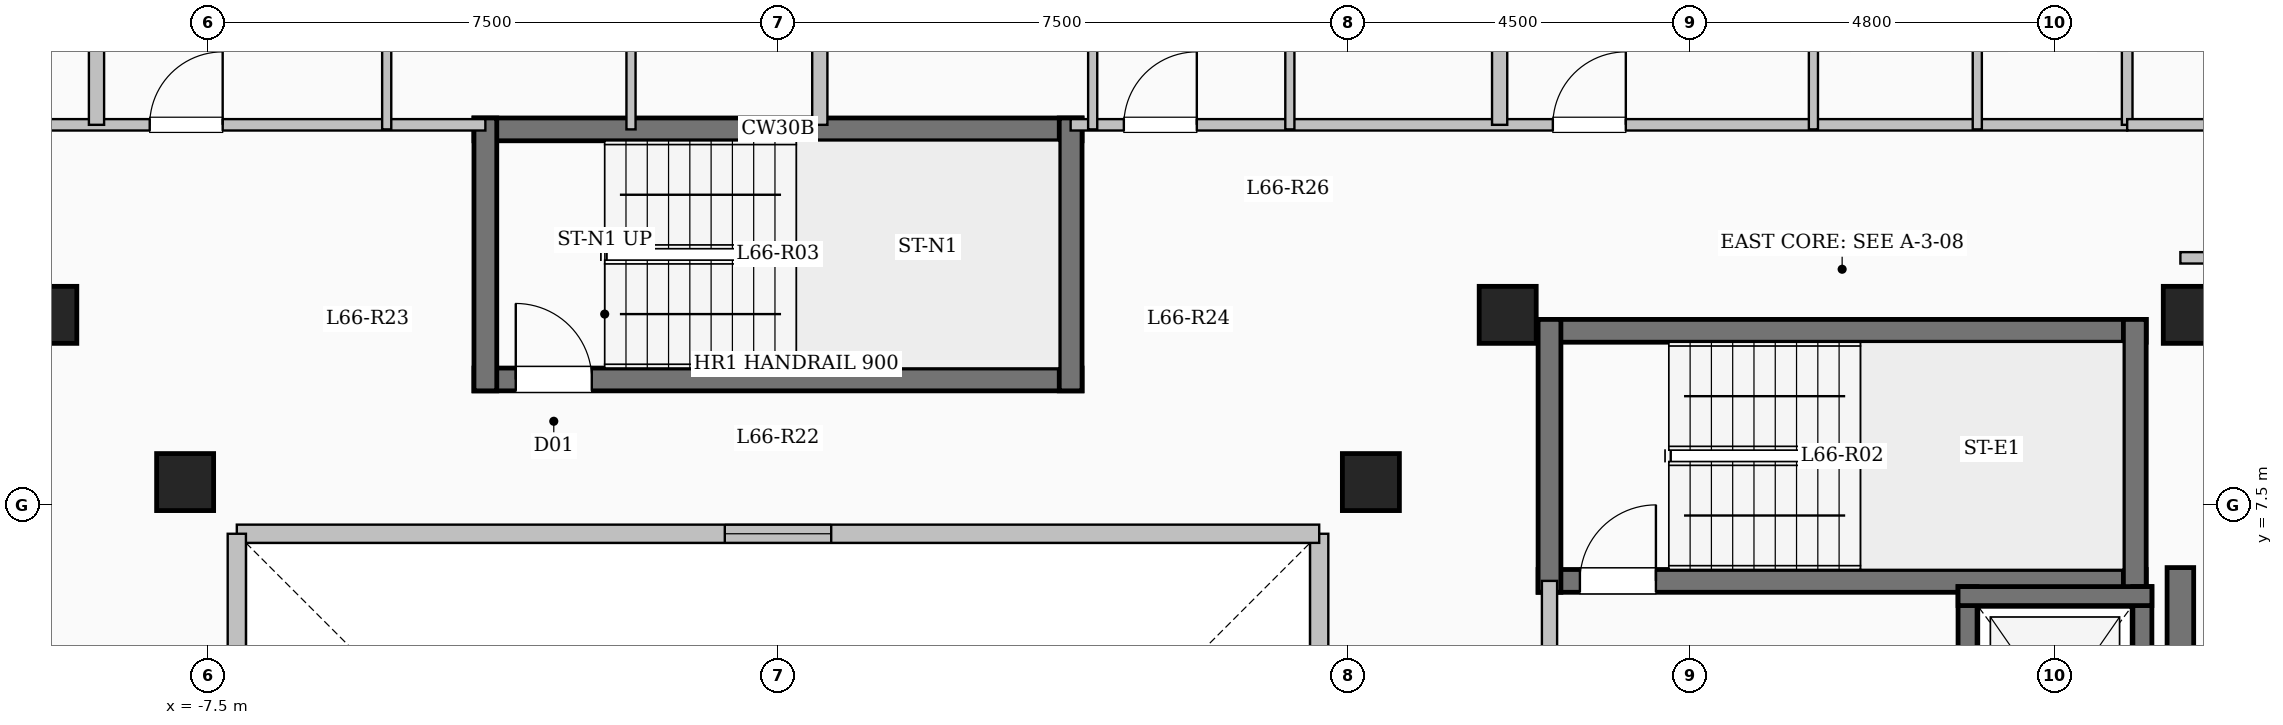
"""IFC4 building model, lengths in metres.
Left out: names, types, materials, properties, quantities, classifications, styles, units other than length and angle.
Written with IfcOpenShell. Run it as: python <this file> out.ifc"""

import sys

from ifc_helpers import new_model, si_unit, direction, frame, frame_2d, origin, origin_2d, place, context, subcontext, project, spatial, rectangle, extrude, element, fill, save


model = new_model("IFC4")
c1 = context("Model", 3, precision=1e-05, world=origin(), true_north=direction((0.0, 1.0)))
c2 = subcontext(c1, "Body", "Model", "MODEL_VIEW")
j1 = project(units=[si_unit("LENGTHUNIT", "METRE"), si_unit("PLANEANGLEUNIT", "RADIAN")], contexts=[c1])
p1 = place(None, origin())
s1 = spatial("IfcSite", under=j1, at=p1, CompositionType="ELEMENT")
p2 = place(p1, origin())
s2 = spatial("IfcBuilding", under=s1, at=p2, CompositionType="ELEMENT")
p3 = place(p2, frame((0.0, 0.0, 244.85)))
s3 = spatial("IfcBuildingStorey", under=s2, at=p3, CompositionType="ELEMENT", Elevation=244.85)
for number, where, z_axis, x_axis in (
    (1, (-7.8, 7.8, 0.0), (0.0, 0.0, 1.0), (1.0, 0.0, 0.0)),
    (2, (7.8, 7.8, 0.0), (0.0, 0.0, 1.0), (1.0, 0.0, 0.0)),
    (3, (-9.6, 10.0, 0.0), (0.0, 0.0, 1.0), (1.0, 0.0, 0.0)),
    (4, (9.6, 10.0, 0.0), (0.0, 0.0, 1.0), (1.0, 0.0, 0.0)),
    (5, (18.6, 10.0, 0.0), (0.0, 0.0, 1.0), (1.0, 0.0, 0.0)),
):
    element("IfcColumn", number, at=place(p3, frame(where, z_axis=z_axis, x_axis=x_axis)), inside=s3, PredefinedType="COLUMN", context=c2, shape_type="SweptSolid", body=[
        extrude(rectangle(XDim=0.75, YDim=0.75, at=origin_2d()), origin(), (0.0, 0.0, 1.0), 3.35),
    ])
p4 = place(p3, frame((7.12, -7.12, 0.0), z_axis=(0.0, 0.0, 1.0), x_axis=(0.0, 1.0, 0.0)))
e6 = element("IfcWall", 6, at=p4, inside=s3, PredefinedType="SOLIDWALL", context=c2, shape_type="SweptSolid", body=[
    extrude(rectangle(XDim=14.24, YDim=0.24, at=frame_2d((7.12, 0.0))), origin(), (0.0, 0.0, 1.0), 3.1),
])
p5 = place(p4, frame((6.42, 0.0, 0.95)))
e7 = element("IfcOpeningElement", 7, at=p5, cuts=e6, PredefinedType="OPENING", context=c2, shape_type="SweptSolid", body=[
    extrude(rectangle(XDim=1.4, YDim=1.5, at=frame_2d((0.7, 0.75))), frame((0.0, 0.13, 0.0), z_axis=(0.0, -1.0, 0.0), x_axis=(1.0, 0.0, 0.0)), (0.0, 0.0, 1.0), 0.26),
])
p6 = place(p3, frame((7.12, 7.12, 0.0), z_axis=(0.0, 0.0, 1.0), x_axis=(-1.0, 0.0, 0.0)))
e8 = element("IfcWall", 8, at=p6, inside=s3, PredefinedType="SOLIDWALL", context=c2, shape_type="SweptSolid", body=[
    extrude(rectangle(XDim=14.24, YDim=0.24, at=frame_2d((7.12, 0.0))), origin(), (0.0, 0.0, 1.0), 3.1),
])
p7 = place(p6, frame((6.42, 0.0, 0.95)))
e9 = element("IfcOpeningElement", 9, at=p7, cuts=e8, PredefinedType="OPENING", context=c2, shape_type="SweptSolid", body=[
    extrude(rectangle(XDim=1.4, YDim=1.5, at=frame_2d((0.7, 0.75))), frame((0.0, 0.13, 0.0), z_axis=(0.0, -1.0, 0.0), x_axis=(1.0, 0.0, 0.0)), (0.0, 0.0, 1.0), 0.26),
])
p8 = place(p3, frame((-7.12, 7.12, 0.0), z_axis=(0.0, 0.0, 1.0), x_axis=(0.0, -1.0, 0.0)))
e10 = element("IfcWall", 10, at=p8, inside=s3, PredefinedType="SOLIDWALL", context=c2, shape_type="SweptSolid", body=[
    extrude(rectangle(XDim=14.24, YDim=0.24, at=frame_2d((7.12, 0.0))), origin(), (0.0, 0.0, 1.0), 3.1),
])
p9 = place(p8, frame((6.42, 0.0, 0.95)))
e11 = element("IfcOpeningElement", 11, at=p9, cuts=e10, PredefinedType="OPENING", context=c2, shape_type="SweptSolid", body=[
    extrude(rectangle(XDim=1.4, YDim=1.5, at=frame_2d((0.7, 0.75))), frame((0.0, 0.13, 0.0), z_axis=(0.0, -1.0, 0.0), x_axis=(1.0, 0.0, 0.0)), (0.0, 0.0, 1.0), 0.26),
])
p10 = place(p3, frame((10.0, 9.79, 0.0), z_axis=(0.0, 0.0, 1.0), x_axis=(1.0, 0.0, 0.0)))
e12 = element("IfcWall", 12, at=p10, inside=s3, PredefinedType="SHEAR", context=c2, shape_type="SweptSolid", body=[
    extrude(rectangle(XDim=8.0, YDim=0.3, at=frame_2d((4.0, 0.0))), origin(), (0.0, 0.0, 1.0), 3.35),
])
p11 = place(p3, frame((10.0, 6.5, 0.0), z_axis=(0.0, 0.0, 1.0), x_axis=(1.0, 0.0, 0.0)))
e13 = element("IfcWall", 13, at=p11, inside=s3, PredefinedType="SHEAR", context=c2, shape_type="SweptSolid", body=[
    extrude(rectangle(XDim=8.0, YDim=0.3, at=frame_2d((4.0, 0.0))), origin(), (0.0, 0.0, 1.0), 3.35),
])
p12 = place(p11, frame((0.55, 0.0, 0.0)))
e14 = element("IfcOpeningElement", 14, at=p12, cuts=e13, PredefinedType="OPENING", context=c2, shape_type="SweptSolid", body=[
    extrude(rectangle(XDim=1.0, YDim=2.15, at=frame_2d((0.5, 1.075))), frame((0.0, 0.16, 0.0), z_axis=(0.0, -1.0, 0.0), x_axis=(1.0, 0.0, 0.0)), (0.0, 0.0, 1.0), 0.32),
])
for number, where, z_axis, x_axis in (
    (15, (10.15, 6.35, 0.0), (0.0, 0.0, 1.0), (0.0, 1.0, 0.0)),
    (16, (17.85, 6.35, 0.0), (0.0, 0.0, 1.0), (0.0, 1.0, 0.0)),
):
    element("IfcWall", number, at=place(p3, frame(where, z_axis=z_axis, x_axis=x_axis)), inside=s3, PredefinedType="SHEAR", context=c2, shape_type="SweptSolid", body=[
        extrude(rectangle(XDim=3.59, YDim=0.3, at=frame_2d((1.795, 0.0))), origin(), (0.0, 0.0, 1.0), 3.35),
    ])
p13 = place(p3, frame((-4.0, 12.44, 0.0), z_axis=(0.0, 0.0, 1.0), x_axis=(1.0, 0.0, 0.0)))
e17 = element("IfcWall", 17, at=p13, inside=s3, PredefinedType="SHEAR", context=c2, shape_type="SweptSolid", body=[
    extrude(rectangle(XDim=8.0, YDim=0.3, at=frame_2d((4.0, 0.0))), origin(), (0.0, 0.0, 1.0), 3.35),
])
p14 = place(p3, frame((-4.0, 9.15, 0.0), z_axis=(0.0, 0.0, 1.0), x_axis=(1.0, 0.0, 0.0)))
e18 = element("IfcWall", 18, at=p14, inside=s3, PredefinedType="SHEAR", context=c2, shape_type="SweptSolid", body=[
    extrude(rectangle(XDim=8.0, YDim=0.3, at=frame_2d((4.0, 0.0))), origin(), (0.0, 0.0, 1.0), 3.35),
])
p15 = place(p14, frame((0.55, 0.0, 0.0)))
e19 = element("IfcOpeningElement", 19, at=p15, cuts=e18, PredefinedType="OPENING", context=c2, shape_type="SweptSolid", body=[
    extrude(rectangle(XDim=1.0, YDim=2.15, at=frame_2d((0.5, 1.075))), frame((0.0, 0.16, 0.0), z_axis=(0.0, -1.0, 0.0), x_axis=(1.0, 0.0, 0.0)), (0.0, 0.0, 1.0), 0.32),
])
for number, where, z_axis, x_axis in (
    (20, (-3.85, 9.0, 0.0), (0.0, 0.0, 1.0), (0.0, 1.0, 0.0)),
    (21, (3.85, 9.0, 0.0), (0.0, 0.0, 1.0), (0.0, 1.0, 0.0)),
):
    element("IfcWall", number, at=place(p3, frame(where, z_axis=z_axis, x_axis=x_axis)), inside=s3, PredefinedType="SHEAR", context=c2, shape_type="SweptSolid", body=[
        extrude(rectangle(XDim=3.59, YDim=0.3, at=frame_2d((1.795, 0.0))), origin(), (0.0, 0.0, 1.0), 3.35),
    ])
p16 = place(p3, frame((10.15, 3.25, 0.0), z_axis=(0.0, 0.0, 1.0), x_axis=(0.0, 1.0, 0.0)))
e22 = element("IfcWall", 22, at=p16, inside=s3, PredefinedType="SOLIDWALL", context=c2, shape_type="SweptSolid", body=[
    extrude(rectangle(XDim=3.25, YDim=0.2, at=frame_2d((1.625, 0.0))), origin(), (0.0, 0.0, 1.0), 3.1),
])
p17 = place(p16, frame((1.1, 0.0, 0.0)))
e23 = element("IfcOpeningElement", 23, at=p17, cuts=e22, PredefinedType="OPENING", context=c2, shape_type="SweptSolid", body=[
    extrude(rectangle(XDim=1.02, YDim=2.15, at=frame_2d((0.51, 1.075))), frame((0.0, 0.11, 0.0), z_axis=(0.0, -1.0, 0.0), x_axis=(1.0, 0.0, 0.0)), (0.0, 0.0, 1.0), 0.22),
])
p18 = place(p3, frame((15.65, 3.175, 0.0), z_axis=(0.0, 0.0, 1.0), x_axis=(0.0, 1.0, 0.0)))
e24 = element("IfcWall", 24, at=p18, inside=s3, PredefinedType="SHEAR", context=c2, shape_type="SweptSolid", body=[
    extrude(rectangle(XDim=3.25, YDim=0.25, at=frame_2d((1.625, 0.0))), origin(), (0.0, 0.0, 1.0), 3.35),
])
p19 = place(p18, frame((1.075, 0.0, 0.0)))
e25 = element("IfcOpeningElement", 25, at=p19, cuts=e24, PredefinedType="OPENING", context=c2, shape_type="SweptSolid", body=[
    extrude(rectangle(XDim=1.1, YDim=2.15, at=frame_2d((0.55, 1.075))), frame((0.0, 0.135, 0.0), z_axis=(0.0, -1.0, 0.0), x_axis=(1.0, 0.0, 0.0)), (0.0, 0.0, 1.0), 0.27),
])
p20 = place(p3, frame((17.95, 3.175, 0.0), z_axis=(0.0, 0.0, 1.0), x_axis=(0.0, 1.0, 0.0)))
e26 = element("IfcWall", 26, at=p20, inside=s3, PredefinedType="SHEAR", context=c2, shape_type="SweptSolid", body=[
    extrude(rectangle(XDim=3.25, YDim=0.25, at=frame_2d((1.625, 0.0))), origin(), (0.0, 0.0, 1.0), 3.35),
])
p21 = place(p3, frame((15.525, 6.3, 0.0), z_axis=(0.0, 0.0, 1.0), x_axis=(1.0, 0.0, 0.0)))
e27 = element("IfcWall", 27, at=p21, inside=s3, PredefinedType="SHEAR", context=c2, shape_type="SweptSolid", body=[
    extrude(rectangle(XDim=2.55, YDim=0.25, at=frame_2d((1.275, 0.0))), origin(), (0.0, 0.0, 1.0), 3.35),
])
p22 = place(p3, frame((18.45, -7.375, 0.0), z_axis=(0.0, 0.0, 1.0), x_axis=(0.0, 1.0, 0.0)))
e28 = element("IfcWall", 28, at=p22, inside=s3, PredefinedType="SHEAR", context=c2, shape_type="SweptSolid", body=[
    extrude(rectangle(XDim=14.05, YDim=0.35, at=frame_2d((7.025, 0.0))), origin(), (0.0, 0.0, 1.0), 3.35),
])
p23 = place(p3, frame((-17.75, 12.5, 0.0), z_axis=(0.0, 0.0, 1.0), x_axis=(1.0, 0.0, 0.0)))
e29 = element("IfcWall", 29, at=p23, inside=s3, PredefinedType="PARTITIONING", context=c2, shape_type="SweptSolid", body=[
    extrude(rectangle(XDim=13.9, YDim=0.15, at=frame_2d((6.95, 0.0))), origin(), (0.0, 0.0, 1.0), 3.1),
])
p24 = place(p23, frame((0.7, 0.0, 0.0)))
e30 = element("IfcOpeningElement", 30, at=p24, cuts=e29, PredefinedType="OPENING", context=c2, shape_type="SweptSolid", body=[
    extrude(rectangle(XDim=0.96, YDim=2.15, at=frame_2d((0.48, 1.075))), frame((0.0, 0.085, 0.0), z_axis=(0.0, -1.0, 0.0), x_axis=(1.0, 0.0, 0.0)), (0.0, 0.0, 1.0), 0.17),
])
p25 = place(p23, frame((9.484, 0.0, 0.0)))
e31 = element("IfcOpeningElement", 31, at=p25, cuts=e29, PredefinedType="OPENING", context=c2, shape_type="SweptSolid", body=[
    extrude(rectangle(XDim=0.96, YDim=2.15, at=frame_2d((0.48, 1.075))), frame((0.0, 0.085, 0.0), z_axis=(0.0, -1.0, 0.0), x_axis=(1.0, 0.0, 0.0)), (0.0, 0.0, 1.0), 0.17),
])
p26 = place(p3, frame((3.85, 12.5, 0.0), z_axis=(0.0, 0.0, 1.0), x_axis=(1.0, 0.0, 0.0)))
e32 = element("IfcWall", 32, at=p26, inside=s3, PredefinedType="PARTITIONING", context=c2, shape_type="SweptSolid", body=[
    extrude(rectangle(XDim=13.9, YDim=0.15, at=frame_2d((6.95, 0.0))), origin(), (0.0, 0.0, 1.0), 3.1),
])
p27 = place(p26, frame((0.7, 0.0, 0.0)))
e33 = element("IfcOpeningElement", 33, at=p27, cuts=e32, PredefinedType="OPENING", context=c2, shape_type="SweptSolid", body=[
    extrude(rectangle(XDim=0.96, YDim=2.15, at=frame_2d((0.48, 1.075))), frame((0.0, 0.085, 0.0), z_axis=(0.0, -1.0, 0.0), x_axis=(1.0, 0.0, 0.0)), (0.0, 0.0, 1.0), 0.17),
])
p28 = place(p26, frame((6.344, 0.0, 0.0)))
e34 = element("IfcOpeningElement", 34, at=p28, cuts=e32, PredefinedType="OPENING", context=c2, shape_type="SweptSolid", body=[
    extrude(rectangle(XDim=0.96, YDim=2.15, at=frame_2d((0.48, 1.075))), frame((0.0, 0.085, 0.0), z_axis=(0.0, -1.0, 0.0), x_axis=(1.0, 0.0, 0.0)), (0.0, 0.0, 1.0), 0.17),
])
p29 = place(p3, frame((0.55, 12.5, 0.0), z_axis=(0.0, 0.0, 1.0), x_axis=(0.0, 1.0, 0.0)))
e35 = element("IfcWall", 35, at=p29, inside=s3, PredefinedType="SOLIDWALL", context=c2, shape_type="SweptSolid", body=[
    extrude(rectangle(XDim=9.88, YDim=0.2, at=frame_2d((4.94, 0.0))), origin(), (0.0, 0.0, 1.0), 3.1),
])
p30 = place(p3, frame((-8.966, 12.5, 0.0), z_axis=(0.0, 0.0, 1.0), x_axis=(0.0, 1.0, 0.0)))
e36 = element("IfcWall", 36, at=p30, inside=s3, PredefinedType="SOLIDWALL", context=c2, shape_type="SweptSolid", body=[
    extrude(rectangle(XDim=8.902, YDim=0.2, at=frame_2d((4.451, 0.0))), origin(), (0.0, 0.0, 1.0), 3.1),
])
p31 = place(p3, frame((-5.148, 12.44, 0.0), z_axis=(0.0, 0.0, 1.0), x_axis=(0.0, 1.0, 0.0)))
e37 = element("IfcWall", 37, at=p31, inside=s3, PredefinedType="PARTITIONING", context=c2, shape_type="SweptSolid", body=[
    extrude(rectangle(XDim=9.903, YDim=0.12, at=frame_2d((4.952, 0.0))), origin(), (0.0, 0.0, 1.0), 3.1),
])
p32 = place(p31, frame((3.075, 0.0, 0.0)))
e38 = element("IfcOpeningElement", 38, at=p32, cuts=e37, PredefinedType="OPENING", context=c2, shape_type="SweptSolid", body=[
    extrude(rectangle(XDim=1.08, YDim=2.15, at=frame_2d((0.54, 1.075))), frame((0.0, 0.07, 0.0), z_axis=(0.0, -1.0, 0.0), x_axis=(1.0, 0.0, 0.0)), (0.0, 0.0, 1.0), 0.14),
])
p33 = place(p3, frame((-1.934, 12.44, 0.0), z_axis=(0.0, 0.0, 1.0), x_axis=(0.0, 1.0, 0.0)))
e39 = element("IfcWall", 39, at=p33, inside=s3, PredefinedType="PARTITIONING", context=c2, shape_type="SweptSolid", body=[
    extrude(rectangle(XDim=2.79, YDim=0.12, at=frame_2d((1.395, 0.0))), origin(), (0.0, 0.0, 1.0), 3.1),
])
p34 = place(p3, frame((9.494, 12.5, 0.0), z_axis=(0.0, 0.0, 1.0), x_axis=(0.0, 1.0, 0.0)))
e40 = element("IfcWall", 40, at=p34, inside=s3, PredefinedType="SOLIDWALL", context=c2, shape_type="SweptSolid", body=[
    extrude(rectangle(XDim=8.771, YDim=0.2, at=frame_2d((4.385, 0.0))), origin(), (0.0, 0.0, 1.0), 3.1),
])
p35 = place(p3, frame((4.14, 12.44, 0.0), z_axis=(0.0, 0.0, 1.0), x_axis=(0.0, 1.0, 0.0)))
e41 = element("IfcWall", 41, at=p35, inside=s3, PredefinedType="PARTITIONING", context=c2, shape_type="SweptSolid", body=[
    extrude(rectangle(XDim=9.94, YDim=0.12, at=frame_2d((4.97, 0.0))), origin(), (0.0, 0.0, 1.0), 3.1),
])
p36 = place(p35, frame((3.245, 0.0, 0.0)))
e42 = element("IfcOpeningElement", 42, at=p36, cuts=e41, PredefinedType="OPENING", context=c2, shape_type="SweptSolid", body=[
    extrude(rectangle(XDim=1.08, YDim=2.15, at=frame_2d((0.54, 1.075))), frame((0.0, 0.07, 0.0), z_axis=(0.0, -1.0, 0.0), x_axis=(1.0, 0.0, 0.0)), (0.0, 0.0, 1.0), 0.14),
])
p37 = place(p3, frame((6.734, 12.44, 0.0), z_axis=(0.0, 0.0, 1.0), x_axis=(0.0, 1.0, 0.0)))
e43 = element("IfcWall", 43, at=p37, inside=s3, PredefinedType="PARTITIONING", context=c2, shape_type="SweptSolid", body=[
    extrude(rectangle(XDim=2.96, YDim=0.12, at=frame_2d((1.48, 0.0))), origin(), (0.0, 0.0, 1.0), 3.1),
])
p38 = place(p3, frame((13.622, 12.44, 0.0), z_axis=(0.0, 0.0, 1.0), x_axis=(0.0, 1.0, 0.0)))
e44 = element("IfcWall", 44, at=p38, inside=s3, PredefinedType="PARTITIONING", context=c2, shape_type="SweptSolid", body=[
    extrude(rectangle(XDim=8.46, YDim=0.12, at=frame_2d((4.23, 0.0))), origin(), (0.0, 0.0, 1.0), 3.1),
])
p39 = place(p38, frame((2.735, 0.0, 0.0)))
e45 = element("IfcOpeningElement", 45, at=p39, cuts=e44, PredefinedType="OPENING", context=c2, shape_type="SweptSolid", body=[
    extrude(rectangle(XDim=1.08, YDim=2.15, at=frame_2d((0.54, 1.075))), frame((0.0, 0.07, 0.0), z_axis=(0.0, -1.0, 0.0), x_axis=(1.0, 0.0, 0.0)), (0.0, 0.0, 1.0), 0.14),
])
p40 = place(p3, frame((15.778, 12.44, 0.0), z_axis=(0.0, 0.0, 1.0), x_axis=(0.0, 1.0, 0.0)))
e46 = element("IfcWall", 46, at=p40, inside=s3, PredefinedType="PARTITIONING", context=c2, shape_type="SweptSolid", body=[
    extrude(rectangle(XDim=2.45, YDim=0.12, at=frame_2d((1.225, 0.0))), origin(), (0.0, 0.0, 1.0), 3.1),
])
p41 = place(p3, frame((18.45, 10.75, 0.0), z_axis=(0.0, 0.0, 1.0), x_axis=(1.0, 0.0, 0.0)))
e47 = element("IfcWall", 47, at=p41, inside=s3, PredefinedType="PARTITIONING", context=c2, shape_type="SweptSolid", body=[
    extrude(rectangle(XDim=4.23, YDim=0.15, at=frame_2d((2.115, 0.0))), origin(), (0.0, 0.0, 1.0), 3.1),
])
p42 = place(p3, frame((17.75, 12.5, 0.0), z_axis=(0.0, 0.0, 1.0), x_axis=(0.0, 1.0, 0.0)))
e48 = element("IfcWall", 48, at=p42, inside=s3, PredefinedType="PARTITIONING", context=c2, shape_type="SweptSolid", body=[
    extrude(rectangle(XDim=5.05, YDim=0.14, at=frame_2d((2.525, 0.0))), origin(), (0.0, 0.0, 1.0), 3.1),
])
p43 = place(p3, frame((17.75, 12.5, 0.0), z_axis=(0.0, 0.0, 1.0), x_axis=(1.0, 0.0, 0.0)))
e49 = element("IfcWall", 49, at=p43, inside=s3, PredefinedType="PARTITIONING", context=c2, shape_type="SweptSolid", body=[
    extrude(rectangle(XDim=4.93, YDim=0.15, at=frame_2d((2.465, 0.0))), origin(), (0.0, 0.0, 1.0), 3.1),
])
p44 = place(p43, frame((1.99, 0.0, 0.0)))
e50 = element("IfcOpeningElement", 50, at=p44, cuts=e49, PredefinedType="OPENING", context=c2, shape_type="SweptSolid", body=[
    extrude(rectangle(XDim=0.95, YDim=2.15, at=frame_2d((0.475, 1.075))), frame((0.0, 0.085, 0.0), z_axis=(0.0, -1.0, 0.0), x_axis=(1.0, 0.0, 0.0)), (0.0, 0.0, 1.0), 0.17),
])
p45 = place(p7, origin())
e51 = element("IfcWindow", 51, at=p45, inside=s3, PartitioningType="SINGLE_PANEL", PredefinedType="WINDOW", context=c2, shape_type="SweptSolid", body=[
    extrude(rectangle(XDim=1.4, YDim=1.5, at=frame_2d((0.7, 0.75))), frame((0.0, 0.03, 0.0), z_axis=(0.0, -1.0, 0.0), x_axis=(1.0, 0.0, 0.0)), (0.0, 0.0, 1.0), 0.06),
])
fill(e9, e51)
p46 = place(p12, origin())
e52 = element("IfcDoor", 52, at=p46, inside=s3, OperationType="SINGLE_SWING_RIGHT", PredefinedType="DOOR", context=c2, shape_type="SweptSolid", body=[
    extrude(rectangle(XDim=1.0, YDim=2.15, at=frame_2d((0.5, 1.075))), frame((0.0, 0.025, 0.0), z_axis=(0.0, -1.0, 0.0), x_axis=(1.0, 0.0, 0.0)), (0.0, 0.0, 1.0), 0.05),
])
fill(e14, e52)
p47 = place(p15, origin())
e53 = element("IfcDoor", 53, at=p47, inside=s3, OperationType="SINGLE_SWING_LEFT", PredefinedType="DOOR", context=c2, shape_type="SweptSolid", body=[
    extrude(rectangle(XDim=1.0, YDim=2.15, at=frame_2d((0.5, 1.075))), frame((0.0, 0.025, 0.0), z_axis=(0.0, -1.0, 0.0), x_axis=(1.0, 0.0, 0.0)), (0.0, 0.0, 1.0), 0.05),
])
fill(e19, e53)
p48 = place(p25, origin())
e54 = element("IfcDoor", 54, at=p48, inside=s3, OperationType="SINGLE_SWING_RIGHT", PredefinedType="DOOR", context=c2, shape_type="SweptSolid", body=[
    extrude(rectangle(XDim=0.96, YDim=2.15, at=frame_2d((0.48, 1.075))), frame((0.0, 0.025, 0.0), z_axis=(0.0, -1.0, 0.0), x_axis=(1.0, 0.0, 0.0)), (0.0, 0.0, 1.0), 0.05),
])
fill(e31, e54)
p49 = place(p27, origin())
e55 = element("IfcDoor", 55, at=p49, inside=s3, OperationType="SINGLE_SWING_RIGHT", PredefinedType="DOOR", context=c2, shape_type="SweptSolid", body=[
    extrude(rectangle(XDim=0.96, YDim=2.15, at=frame_2d((0.48, 1.075))), frame((0.0, 0.025, 0.0), z_axis=(0.0, -1.0, 0.0), x_axis=(1.0, 0.0, 0.0)), (0.0, 0.0, 1.0), 0.05),
])
fill(e33, e55)
p50 = place(p28, origin())
e56 = element("IfcDoor", 56, at=p50, inside=s3, OperationType="SINGLE_SWING_RIGHT", PredefinedType="DOOR", context=c2, shape_type="SweptSolid", body=[
    extrude(rectangle(XDim=0.96, YDim=2.15, at=frame_2d((0.48, 1.075))), frame((0.0, 0.025, 0.0), z_axis=(0.0, -1.0, 0.0), x_axis=(1.0, 0.0, 0.0)), (0.0, 0.0, 1.0), 0.05),
])
fill(e34, e56)
save(model, sys.argv[1])
